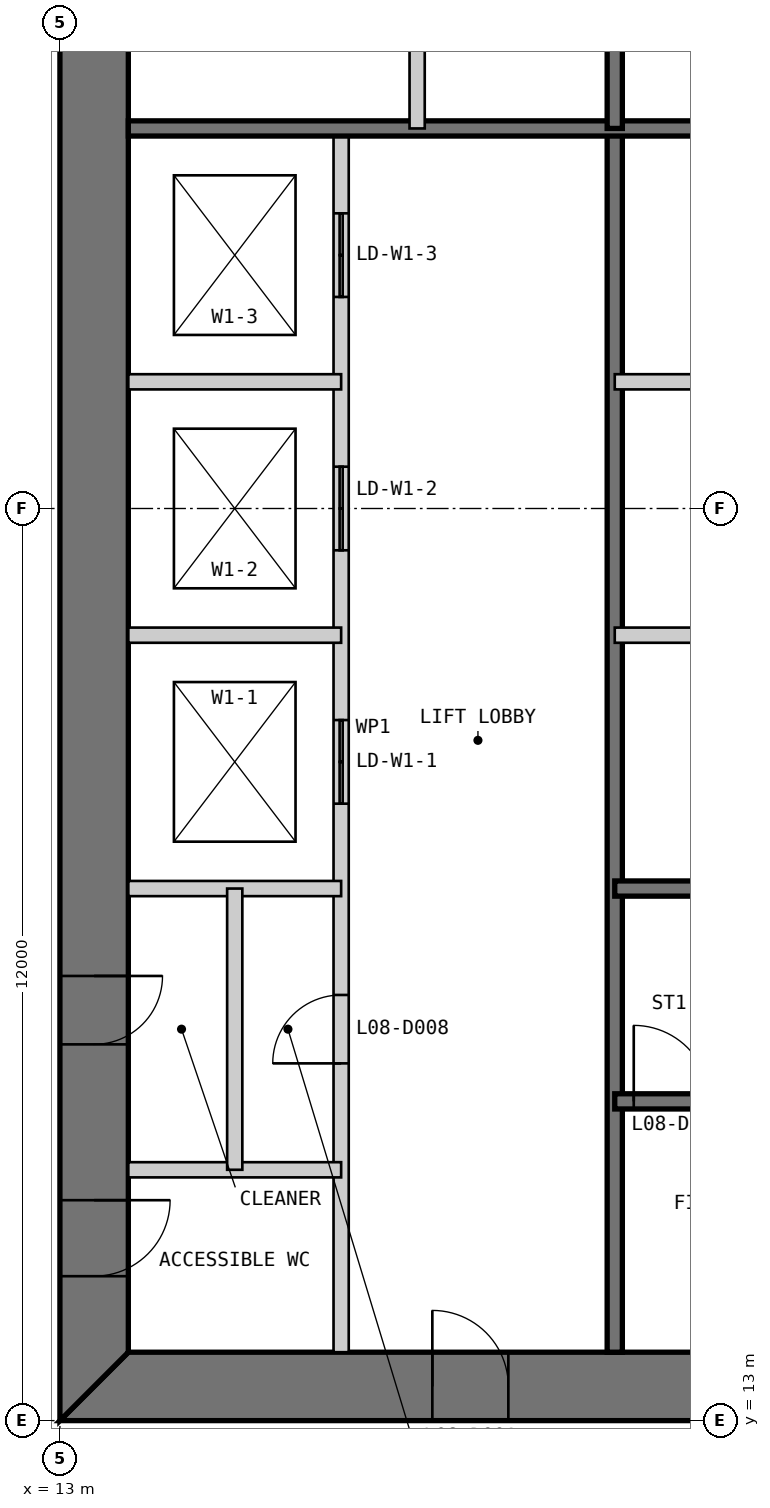
"""IFC4 building model, lengths in metres.
Left out: names, types, materials, properties, quantities, classifications, styles, units other than length and angle.
Written with IfcOpenShell. Run it as: python <this file> out.ifc"""

import sys

from ifc_helpers import new_model, si_unit, direction, frame, frame_2d, origin, place, context, subcontext, project, spatial, polyline, rectangle, outline, extrude, element, fill, save


model = new_model("IFC4")
c1 = context("Model", 3, precision=1e-05, world=origin(), true_north=direction((0.0, 1.0)))
c2 = subcontext(c1, "Body", "Model", "MODEL_VIEW")
j1 = project(units=[si_unit("LENGTHUNIT", "METRE"), si_unit("PLANEANGLEUNIT", "RADIAN")], contexts=[c1])
p1 = place(None, origin())
s1 = spatial("IfcSite", under=j1, at=p1, CompositionType="ELEMENT")
p2 = place(p1, origin())
s2 = spatial("IfcBuilding", under=s1, at=p2, CompositionType="ELEMENT")
p3 = place(p2, frame((0.0, 0.0, 39.0)))
s3 = spatial("IfcBuildingStorey", under=s2, at=p3, CompositionType="ELEMENT", Elevation=39.0)
p4 = place(p3, frame((13.0, 13.45, 0.0), z_axis=(0.0, 0.0, 1.0), x_axis=(1.0, 0.0, 0.0)))
e1 = element("IfcWall", 1, at=p4, inside=s3, PredefinedType="SHEAR", context=c2, shape_type="SweptSolid", body=[
    extrude(outline(polyline([(0.0, -0.45), (24.0, -0.45), (23.1, 0.45), (0.9, 0.45), (0.0, -0.45)])), origin(), (0.0, 0.0, 1.0), 4.0),
])
p5 = place(p4, frame((4.9, 0.0, 0.0)))
e2 = element("IfcOpeningElement", 2, at=p5, cuts=e1, PredefinedType="OPENING", context=c2, shape_type="SweptSolid", body=[
    extrude(rectangle(XDim=1.0, YDim=2.2, at=frame_2d((0.5, 1.1))), frame((0.0, 0.46, 0.0), z_axis=(0.0, -1.0, 0.0), x_axis=(1.0, 0.0, 0.0)), (0.0, 0.0, 1.0), 0.92),
])
p6 = place(p4, frame((8.9, 0.0, 0.0)))
e3 = element("IfcOpeningElement", 3, at=p6, cuts=e1, PredefinedType="OPENING", context=c2, shape_type="SweptSolid", body=[
    extrude(rectangle(XDim=1.1, YDim=2.2, at=frame_2d((0.55, 1.1))), frame((0.0, 0.46, 0.0), z_axis=(0.0, -1.0, 0.0), x_axis=(1.0, 0.0, 0.0)), (0.0, 0.0, 1.0), 0.92),
])
p7 = place(p4, frame((15.05, 0.0, 0.0)))
e4 = element("IfcOpeningElement", 4, at=p7, cuts=e1, PredefinedType="OPENING", context=c2, shape_type="SweptSolid", body=[
    extrude(rectangle(XDim=0.9, YDim=2.2, at=frame_2d((0.45, 1.1))), frame((0.0, 0.46, 0.0), z_axis=(0.0, -1.0, 0.0), x_axis=(1.0, 0.0, 0.0)), (0.0, 0.0, 1.0), 0.92),
])
p8 = place(p4, frame((17.9, 0.0, 0.0)))
e5 = element("IfcOpeningElement", 5, at=p8, cuts=e1, PredefinedType="OPENING", context=c2, shape_type="SweptSolid", body=[
    extrude(rectangle(XDim=1.0, YDim=2.2, at=frame_2d((0.5, 1.1))), frame((0.0, 0.46, 0.0), z_axis=(0.0, -1.0, 0.0), x_axis=(1.0, 0.0, 0.0)), (0.0, 0.0, 1.0), 0.92),
])
p9 = place(p4, frame((21.4, 0.0, 0.0)))
e6 = element("IfcOpeningElement", 6, at=p9, cuts=e1, PredefinedType="OPENING", context=c2, shape_type="SweptSolid", body=[
    extrude(rectangle(XDim=1.0, YDim=2.2, at=frame_2d((0.5, 1.1))), frame((0.0, 0.46, 0.0), z_axis=(0.0, -1.0, 0.0), x_axis=(1.0, 0.0, 0.0)), (0.0, 0.0, 1.0), 0.92),
])
p10 = place(p3, frame((13.45, 36.1, 0.0), z_axis=(0.0, 0.0, 1.0), x_axis=(0.0, -1.0, 0.0)))
e7 = element("IfcWall", 7, at=p10, inside=s3, PredefinedType="SHEAR", context=c2, shape_type="SweptSolid", body=[
    extrude(outline(polyline([(-0.9, -0.45), (23.1, -0.45), (22.2, 0.45), (0.0, 0.45), (-0.9, -0.45)])), origin(), (0.0, 0.0, 1.0), 4.0),
])
p11 = place(p10, frame((20.2, 0.0, 0.0)))
e8 = element("IfcOpeningElement", 8, at=p11, cuts=e7, PredefinedType="OPENING", context=c2, shape_type="SweptSolid", body=[
    extrude(rectangle(XDim=1.0, YDim=2.2, at=frame_2d((0.5, 1.1))), frame((0.0, 0.46, 0.0), z_axis=(0.0, -1.0, 0.0), x_axis=(1.0, 0.0, 0.0)), (0.0, 0.0, 1.0), 0.92),
])
p12 = place(p10, frame((17.25, 0.0, 0.0)))
e9 = element("IfcOpeningElement", 9, at=p12, cuts=e7, PredefinedType="OPENING", context=c2, shape_type="SweptSolid", body=[
    extrude(rectangle(XDim=0.9, YDim=2.2, at=frame_2d((0.45, 1.1))), frame((0.0, 0.46, 0.0), z_axis=(0.0, -1.0, 0.0), x_axis=(1.0, 0.0, 0.0)), (0.0, 0.0, 1.0), 0.92),
])
p13 = place(p3, frame((16.7, 13.9, 0.0), z_axis=(0.0, 0.0, 1.0), x_axis=(0.0, 1.0, 0.0)))
e10 = element("IfcWall", 10, at=p13, inside=s3, PredefinedType="PARTITIONING", context=c2, shape_type="SweptSolid", body=[
    extrude(rectangle(XDim=16.1, YDim=0.2, at=frame_2d((8.05, 0.0))), origin(), (0.0, 0.0, 1.0), 3.8),
])
p14 = place(p13, frame((3.8, 0.0, 0.0)))
e11 = element("IfcOpeningElement", 11, at=p14, cuts=e10, PredefinedType="OPENING", context=c2, shape_type="SweptSolid", body=[
    extrude(rectangle(XDim=0.9, YDim=2.2, at=frame_2d((0.45, 1.1))), frame((0.0, 0.11, 0.0), z_axis=(0.0, -1.0, 0.0), x_axis=(1.0, 0.0, 0.0)), (0.0, 0.0, 1.0), 0.22),
])
p15 = place(p13, frame((7.217, 0.0, 0.0)))
e12 = element("IfcOpeningElement", 12, at=p15, cuts=e10, PredefinedType="OPENING", context=c2, shape_type="SweptSolid", body=[
    extrude(rectangle(XDim=1.1, YDim=2.2, at=frame_2d((0.55, 1.1))), frame((0.0, 0.11, 0.0), z_axis=(0.0, -1.0, 0.0), x_axis=(1.0, 0.0, 0.0)), (0.0, 0.0, 1.0), 0.22),
])
p16 = place(p13, frame((10.55, 0.0, 0.0)))
e13 = element("IfcOpeningElement", 13, at=p16, cuts=e10, PredefinedType="OPENING", context=c2, shape_type="SweptSolid", body=[
    extrude(rectangle(XDim=1.1, YDim=2.2, at=frame_2d((0.55, 1.1))), frame((0.0, 0.11, 0.0), z_axis=(0.0, -1.0, 0.0), x_axis=(1.0, 0.0, 0.0)), (0.0, 0.0, 1.0), 0.22),
])
p17 = place(p13, frame((13.883, 0.0, 0.0)))
e14 = element("IfcOpeningElement", 14, at=p17, cuts=e10, PredefinedType="OPENING", context=c2, shape_type="SweptSolid", body=[
    extrude(rectangle(XDim=1.1, YDim=2.2, at=frame_2d((0.55, 1.1))), frame((0.0, 0.11, 0.0), z_axis=(0.0, -1.0, 0.0), x_axis=(1.0, 0.0, 0.0)), (0.0, 0.0, 1.0), 0.22),
])
p18 = place(p3, frame((20.3, 13.9, 0.0), z_axis=(0.0, 0.0, 1.0), x_axis=(0.0, 1.0, 0.0)))
e15 = element("IfcWall", 15, at=p18, inside=s3, PredefinedType="SOLIDWALL", context=c2, shape_type="SweptSolid", body=[
    extrude(rectangle(XDim=16.1, YDim=0.2, at=frame_2d((8.05, 0.0))), origin(), (0.0, 0.0, 1.0), 3.8),
])
for number, where, z_axis, x_axis in (
    (16, (13.9, 20.0, 0.0), (0.0, 0.0, 1.0), (1.0, 0.0, 0.0)),
    (17, (13.9, 23.333, 0.0), (0.0, 0.0, 1.0), (1.0, 0.0, 0.0)),
    (18, (13.9, 26.667, 0.0), (0.0, 0.0, 1.0), (1.0, 0.0, 0.0)),
    (19, (20.3, 23.333, 0.0), (0.0, 0.0, 1.0), (1.0, 0.0, 0.0)),
    (20, (20.3, 26.667, 0.0), (0.0, 0.0, 1.0), (1.0, 0.0, 0.0)),
):
    element("IfcWall", number, at=place(p3, frame(where, z_axis=z_axis, x_axis=x_axis)), inside=s3, PredefinedType="PARTITIONING", context=c2, shape_type="SweptSolid", body=[
        extrude(rectangle(XDim=2.8, YDim=0.2, at=frame_2d((1.4, 0.0))), origin(), (0.0, 0.0, 1.0), 3.8),
    ])
p19 = place(p3, frame((20.3, 17.2, 0.0), z_axis=(0.0, 0.0, 1.0), x_axis=(1.0, 0.0, 0.0)))
e21 = element("IfcWall", 21, at=p19, inside=s3, PredefinedType="SOLIDWALL", context=c2, shape_type="SweptSolid", body=[
    extrude(rectangle(XDim=9.4, YDim=0.2, at=frame_2d((4.7, 0.0))), origin(), (0.0, 0.0, 1.0), 3.8),
])
p20 = place(p19, frame((0.25, 0.0, 0.0)))
e22 = element("IfcOpeningElement", 22, at=p20, cuts=e21, PredefinedType="OPENING", context=c2, shape_type="SweptSolid", body=[
    extrude(rectangle(XDim=1.0, YDim=2.2, at=frame_2d((0.5, 1.1))), frame((0.0, 0.11, 0.0), z_axis=(0.0, -1.0, 0.0), x_axis=(1.0, 0.0, 0.0)), (0.0, 0.0, 1.0), 0.22),
])
p21 = place(p3, frame((20.3, 20.0, 0.0), z_axis=(0.0, 0.0, 1.0), x_axis=(1.0, 0.0, 0.0)))
e23 = element("IfcWall", 23, at=p21, inside=s3, PredefinedType="SOLIDWALL", context=c2, shape_type="SweptSolid", body=[
    extrude(rectangle(XDim=15.8, YDim=0.2, at=frame_2d((7.9, 0.0))), origin(), (0.0, 0.0, 1.0), 3.8),
])
p22 = place(p3, frame((13.9, 16.3, 0.0), z_axis=(0.0, 0.0, 1.0), x_axis=(1.0, 0.0, 0.0)))
e24 = element("IfcWall", 24, at=p22, inside=s3, PredefinedType="PARTITIONING", context=c2, shape_type="SweptSolid", body=[
    extrude(rectangle(XDim=2.8, YDim=0.2, at=frame_2d((1.4, 0.0))), origin(), (0.0, 0.0, 1.0), 3.8),
])
p23 = place(p3, frame((15.3, 16.3, 0.0), z_axis=(0.0, 0.0, 1.0), x_axis=(0.0, 1.0, 0.0)))
e25 = element("IfcWall", 25, at=p23, inside=s3, PredefinedType="PARTITIONING", context=c2, shape_type="SweptSolid", body=[
    extrude(rectangle(XDim=3.7, YDim=0.2, at=frame_2d((1.85, 0.0))), origin(), (0.0, 0.0, 1.0), 3.8),
])
p24 = place(p3, frame((29.7, 30.0, 0.0), z_axis=(0.0, 0.0, 1.0), x_axis=(-1.0, 0.0, 0.0)))
e26 = element("IfcWall", 26, at=p24, inside=s3, PredefinedType="SOLIDWALL", context=c2, shape_type="SweptSolid", body=[
    extrude(rectangle(XDim=15.8, YDim=0.2, at=frame_2d((7.9, 0.0))), origin(), (0.0, 0.0, 1.0), 3.8),
])
p25 = place(p3, frame((20.3, 36.1, 0.0), z_axis=(0.0, 0.0, 1.0), x_axis=(0.0, -1.0, 0.0)))
e27 = element("IfcWall", 27, at=p25, inside=s3, PredefinedType="SOLIDWALL", context=c2, shape_type="SweptSolid", body=[
    extrude(rectangle(XDim=6.1, YDim=0.2, at=frame_2d((3.05, 0.0))), origin(), (0.0, 0.0, 1.0), 3.8),
])
p26 = place(p3, frame((17.7, 36.1, 0.0), z_axis=(0.0, 0.0, 1.0), x_axis=(0.0, -1.0, 0.0)))
e28 = element("IfcWall", 28, at=p26, inside=s3, PredefinedType="PARTITIONING", context=c2, shape_type="SweptSolid", body=[
    extrude(rectangle(XDim=6.1, YDim=0.2, at=frame_2d((3.05, 0.0))), origin(), (0.0, 0.0, 1.0), 3.8),
])
p27 = place(p5, origin())
e29 = element("IfcDoor", 29, at=p27, inside=s3, OperationType="SINGLE_SWING_LEFT", PredefinedType="DOOR", context=c2, shape_type="SweptSolid", body=[
    extrude(rectangle(XDim=1.0, YDim=2.2, at=frame_2d((0.5, 1.1))), frame((0.0, 0.025, 0.0), z_axis=(0.0, -1.0, 0.0), x_axis=(1.0, 0.0, 0.0)), (0.0, 0.0, 1.0), 0.05),
    extrude(outline(polyline([(0.0, 0.0), (0.04, 0.0), (0.04, 2.16), (0.96, 2.16), (0.96, 0.0), (1.0, 0.0), (1.0, 2.2), (0.0, 2.2), (0.0, 0.0)])), frame((0.0, 0.3, 0.0), z_axis=(0.0, -1.0, 0.0), x_axis=(1.0, 0.0, 0.0)), (0.0, 0.0, 1.0), 0.6),
])
fill(e2, e29)
p28 = place(p20, origin())
e30 = element("IfcDoor", 30, at=p28, inside=s3, OperationType="SINGLE_SWING_LEFT", PredefinedType="DOOR", context=c2, shape_type="SweptSolid", body=[
    extrude(rectangle(XDim=1.0, YDim=2.2, at=frame_2d((0.5, 1.1))), frame((0.0, 0.025, 0.0), z_axis=(0.0, -1.0, 0.0), x_axis=(1.0, 0.0, 0.0)), (0.0, 0.0, 1.0), 0.05),
])
fill(e22, e30)
p29 = place(p11, origin())
e31 = element("IfcDoor", 31, at=p29, inside=s3, OperationType="SINGLE_SWING_LEFT", PredefinedType="DOOR", context=c2, shape_type="SweptSolid", body=[
    extrude(rectangle(XDim=1.0, YDim=2.2, at=frame_2d((0.5, 1.1))), frame((0.0, 0.025, 0.0), z_axis=(0.0, -1.0, 0.0), x_axis=(1.0, 0.0, 0.0)), (0.0, 0.0, 1.0), 0.05),
    extrude(outline(polyline([(0.0, 0.0), (0.04, 0.0), (0.04, 2.16), (0.96, 2.16), (0.96, 0.0), (1.0, 0.0), (1.0, 2.2), (0.0, 2.2), (0.0, 0.0)])), frame((0.0, 0.3, 0.0), z_axis=(0.0, -1.0, 0.0), x_axis=(1.0, 0.0, 0.0)), (0.0, 0.0, 1.0), 0.6),
])
fill(e8, e31)
p30 = place(p14, origin())
e32 = element("IfcDoor", 32, at=p30, inside=s3, OperationType="SINGLE_SWING_LEFT", PredefinedType="DOOR", context=c2, shape_type="SweptSolid", body=[
    extrude(rectangle(XDim=0.9, YDim=2.2, at=frame_2d((0.45, 1.1))), frame((0.0, 0.025, 0.0), z_axis=(0.0, -1.0, 0.0), x_axis=(1.0, 0.0, 0.0)), (0.0, 0.0, 1.0), 0.05),
])
fill(e11, e32)
p31 = place(p12, origin())
e33 = element("IfcDoor", 33, at=p31, inside=s3, OperationType="SINGLE_SWING_LEFT", PredefinedType="DOOR", context=c2, shape_type="SweptSolid", body=[
    extrude(rectangle(XDim=0.9, YDim=2.2, at=frame_2d((0.45, 1.1))), frame((0.0, 0.025, 0.0), z_axis=(0.0, -1.0, 0.0), x_axis=(1.0, 0.0, 0.0)), (0.0, 0.0, 1.0), 0.05),
    extrude(outline(polyline([(0.0, 0.0), (0.04, 0.0), (0.04, 2.16), (0.86, 2.16), (0.86, 0.0), (0.9, 0.0), (0.9, 2.2), (0.0, 2.2), (0.0, 0.0)])), frame((0.0, 0.3, 0.0), z_axis=(0.0, -1.0, 0.0), x_axis=(1.0, 0.0, 0.0)), (0.0, 0.0, 1.0), 0.6),
])
fill(e9, e33)
p32 = place(p15, origin())
e34 = element("IfcDoor", 34, at=p32, inside=s3, OperationType="DOUBLE_DOOR_SLIDING", PredefinedType="DOOR", context=c2, shape_type="SweptSolid", body=[
    extrude(rectangle(XDim=1.1, YDim=2.2, at=frame_2d((0.55, 1.1))), frame((0.0, 0.025, 0.0), z_axis=(0.0, -1.0, 0.0), x_axis=(1.0, 0.0, 0.0)), (0.0, 0.0, 1.0), 0.05),
])
fill(e12, e34)
p33 = place(p16, origin())
e35 = element("IfcDoor", 35, at=p33, inside=s3, OperationType="DOUBLE_DOOR_SLIDING", PredefinedType="DOOR", context=c2, shape_type="SweptSolid", body=[
    extrude(rectangle(XDim=1.1, YDim=2.2, at=frame_2d((0.55, 1.1))), frame((0.0, 0.025, 0.0), z_axis=(0.0, -1.0, 0.0), x_axis=(1.0, 0.0, 0.0)), (0.0, 0.0, 1.0), 0.05),
])
fill(e13, e35)
p34 = place(p17, origin())
e36 = element("IfcDoor", 36, at=p34, inside=s3, OperationType="DOUBLE_DOOR_SLIDING", PredefinedType="DOOR", context=c2, shape_type="SweptSolid", body=[
    extrude(rectangle(XDim=1.1, YDim=2.2, at=frame_2d((0.55, 1.1))), frame((0.0, 0.025, 0.0), z_axis=(0.0, -1.0, 0.0), x_axis=(1.0, 0.0, 0.0)), (0.0, 0.0, 1.0), 0.05),
])
fill(e14, e36)
save(model, sys.argv[1])
